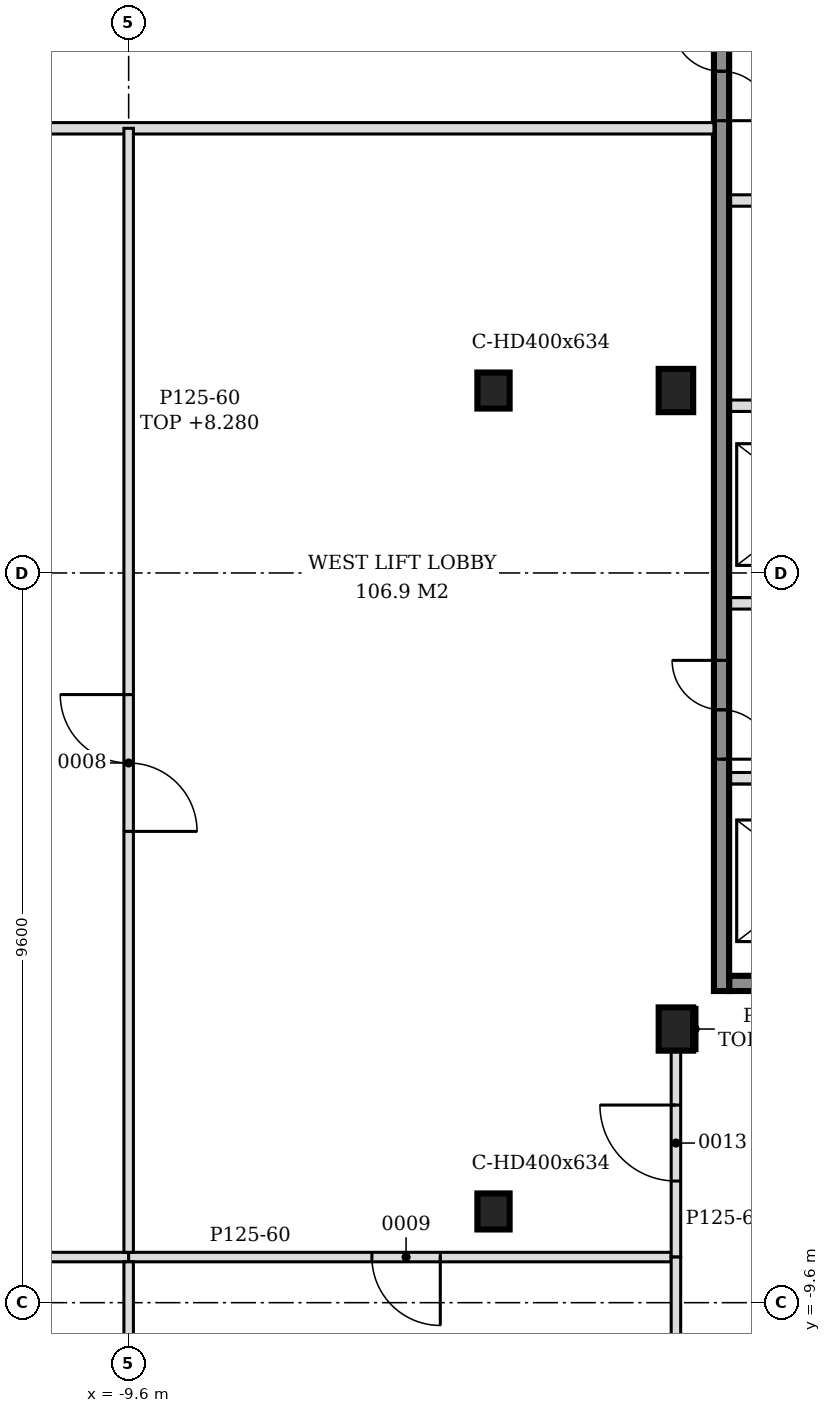
"""IFC4 building model, lengths in metres.
Left out: names, types, materials, properties, quantities, classifications, styles, units other than length and angle.
Written with IfcOpenShell. Run it as: python <this file> out.ifc"""

import sys

from ifc_helpers import new_model, si_unit, direction, frame, frame_2d, origin, origin_2d, place, context, subcontext, project, spatial, polyline, rectangle, i_section, outline, extrude, element, fill, save


model = new_model("IFC4")
c1 = context("Model", 3, precision=1e-05, world=origin(), true_north=direction((0.0, 1.0)))
c2 = subcontext(c1, "Body", "Model", "MODEL_VIEW")
j1 = project(units=[si_unit("LENGTHUNIT", "METRE"), si_unit("PLANEANGLEUNIT", "RADIAN")], contexts=[c1])
p1 = place(None, origin())
s1 = spatial("IfcSite", under=j1, at=p1, CompositionType="ELEMENT")
p2 = place(p1, origin())
s2 = spatial("IfcBuilding", under=s1, at=p2, CompositionType="ELEMENT")
p3 = place(p2, origin())
s3 = spatial("IfcBuildingStorey", under=s2, at=p3, CompositionType="ELEMENT", Elevation=0.0)
for number, where, z_axis, x_axis in (
    (1, (-4.8, -8.4, -0.25), (0.0, 0.0, 1.0), (1.0, 0.0, 0.0)),
    (2, (-4.8, 2.4, -0.25), (0.0, 0.0, 1.0), (1.0, 0.0, 0.0)),
):
    element("IfcColumn", number, at=place(p3, frame(where, z_axis=z_axis, x_axis=x_axis)), inside=s3, PredefinedType="COLUMN", context=c2, shape_type="SweptSolid", body=[
        extrude(i_section(OverallWidth=0.424, OverallDepth=0.474, WebThickness=0.048, FlangeThickness=0.077, FilletRadius=0.015, at=origin_2d()), origin(), (0.0, 0.0, 1.0), 9.05),
    ])
for number, where, z_axis, x_axis in (
    (3, (-2.4, -6.0, -0.25), (0.0, 0.0, 1.0), (1.0, 0.0, 0.0)),
    (4, (-2.4, 2.4, -0.25), (0.0, 0.0, 1.0), (1.0, 0.0, 0.0)),
):
    element("IfcColumn", number, at=place(p3, frame(where, z_axis=z_axis, x_axis=x_axis)), inside=s3, PredefinedType="COLUMN", context=c2, shape_type="SweptSolid", body=[
        extrude(i_section(OverallWidth=0.454, OverallDepth=0.569, WebThickness=0.078, FlangeThickness=0.125, FilletRadius=0.015, at=origin_2d()), origin(), (0.0, 0.0, 1.0), 9.05),
    ])
p4 = place(p3, frame((-1.7, -5.4, 0.0), z_axis=(0.0, 0.0, 1.0), x_axis=(1.0, 0.0, 0.0)))
e5 = element("IfcWall", 5, at=p4, inside=s3, PredefinedType="SOLIDWALL", context=c2, shape_type="SweptSolid", body=[
    extrude(rectangle(XDim=7.9, YDim=0.2, at=frame_2d((3.95, 0.0))), origin(), (0.0, 0.0, 1.0), 8.8),
])
p5 = place(p3, frame((-1.7, -2.7, 0.0), z_axis=(0.0, 0.0, 1.0), x_axis=(1.0, 0.0, 0.0)))
e6 = element("IfcWall", 6, at=p5, inside=s3, PredefinedType="SOLIDWALL", context=c2, shape_type="SweptSolid", body=[
    extrude(rectangle(XDim=7.9, YDim=0.15, at=frame_2d((3.95, 0.0))), origin(), (0.0, 0.0, 1.0), 8.8),
])
p6 = place(p5, frame((0.6, 0.0, 0.0)))
e7 = element("IfcOpeningElement", 7, at=p6, cuts=e6, PredefinedType="OPENING", context=c2, shape_type="SweptSolid", body=[
    extrude(rectangle(XDim=1.1, YDim=2.1, at=frame_2d((0.55, 1.05))), frame((0.0, 0.085, 0.0), z_axis=(0.0, -1.0, 0.0), x_axis=(1.0, 0.0, 0.0)), (0.0, 0.0, 1.0), 0.17),
])
p7 = place(p5, frame((3.1, 0.0, 0.0)))
e8 = element("IfcOpeningElement", 8, at=p7, cuts=e6, PredefinedType="OPENING", context=c2, shape_type="SweptSolid", body=[
    extrude(rectangle(XDim=1.1, YDim=2.1, at=frame_2d((0.55, 1.05))), frame((0.0, 0.085, 0.0), z_axis=(0.0, -1.0, 0.0), x_axis=(1.0, 0.0, 0.0)), (0.0, 0.0, 1.0), 0.17),
])
p8 = place(p5, frame((5.7, 0.0, 0.0)))
e9 = element("IfcOpeningElement", 9, at=p8, cuts=e6, PredefinedType="OPENING", context=c2, shape_type="SweptSolid", body=[
    extrude(rectangle(XDim=1.4, YDim=2.1, at=frame_2d((0.7, 1.05))), frame((0.0, 0.085, 0.0), z_axis=(0.0, -1.0, 0.0), x_axis=(1.0, 0.0, 0.0)), (0.0, 0.0, 1.0), 0.17),
])
p9 = place(p3, frame((-1.7, -0.4, 0.0), z_axis=(0.0, 0.0, 1.0), x_axis=(1.0, 0.0, 0.0)))
e10 = element("IfcWall", 10, at=p9, inside=s3, PredefinedType="SOLIDWALL", context=c2, shape_type="SweptSolid", body=[
    extrude(rectangle(XDim=15.925, YDim=0.15, at=frame_2d((7.962, 0.0))), origin(), (0.0, 0.0, 1.0), 8.8),
])
p10 = place(p9, frame((0.6, 0.0, 0.0)))
e11 = element("IfcOpeningElement", 11, at=p10, cuts=e10, PredefinedType="OPENING", context=c2, shape_type="SweptSolid", body=[
    extrude(rectangle(XDim=1.1, YDim=2.1, at=frame_2d((0.55, 1.05))), frame((0.0, 0.085, 0.0), z_axis=(0.0, -1.0, 0.0), x_axis=(1.0, 0.0, 0.0)), (0.0, 0.0, 1.0), 0.17),
])
p11 = place(p9, frame((3.1, 0.0, 0.0)))
e12 = element("IfcOpeningElement", 12, at=p11, cuts=e10, PredefinedType="OPENING", context=c2, shape_type="SweptSolid", body=[
    extrude(rectangle(XDim=1.1, YDim=2.1, at=frame_2d((0.55, 1.05))), frame((0.0, 0.085, 0.0), z_axis=(0.0, -1.0, 0.0), x_axis=(1.0, 0.0, 0.0)), (0.0, 0.0, 1.0), 0.17),
])
p12 = place(p9, frame((5.7, 0.0, 0.0)))
e13 = element("IfcOpeningElement", 13, at=p12, cuts=e10, PredefinedType="OPENING", context=c2, shape_type="SweptSolid", body=[
    extrude(rectangle(XDim=1.4, YDim=2.1, at=frame_2d((0.7, 1.05))), frame((0.0, 0.085, 0.0), z_axis=(0.0, -1.0, 0.0), x_axis=(1.0, 0.0, 0.0)), (0.0, 0.0, 1.0), 0.17),
])
p13 = place(p9, frame((8.7, 0.0, 0.0)))
e14 = element("IfcOpeningElement", 14, at=p13, cuts=e10, PredefinedType="OPENING", context=c2, shape_type="SweptSolid", body=[
    extrude(rectangle(XDim=1.4, YDim=2.1, at=frame_2d((0.7, 1.05))), frame((0.0, 0.085, 0.0), z_axis=(0.0, -1.0, 0.0), x_axis=(1.0, 0.0, 0.0)), (0.0, 0.0, 1.0), 0.17),
])
p14 = place(p9, frame((11.575, 0.0, 0.0)))
e15 = element("IfcOpeningElement", 15, at=p14, cuts=e10, PredefinedType="OPENING", context=c2, shape_type="SweptSolid", body=[
    extrude(rectangle(XDim=1.2, YDim=2.1, at=frame_2d((0.6, 1.05))), frame((0.0, 0.085, 0.0), z_axis=(0.0, -1.0, 0.0), x_axis=(1.0, 0.0, 0.0)), (0.0, 0.0, 1.0), 0.17),
])
p15 = place(p9, frame((14.125, 0.0, 0.0)))
e16 = element("IfcOpeningElement", 16, at=p15, cuts=e10, PredefinedType="OPENING", context=c2, shape_type="SweptSolid", body=[
    extrude(rectangle(XDim=1.2, YDim=2.1, at=frame_2d((0.6, 1.05))), frame((0.0, 0.085, 0.0), z_axis=(0.0, -1.0, 0.0), x_axis=(1.0, 0.0, 0.0)), (0.0, 0.0, 1.0), 0.17),
])
p16 = place(p3, frame((-1.7, 2.2, 0.0), z_axis=(0.0, 0.0, 1.0), x_axis=(1.0, 0.0, 0.0)))
e17 = element("IfcWall", 17, at=p16, inside=s3, PredefinedType="SOLIDWALL", context=c2, shape_type="SweptSolid", body=[
    extrude(rectangle(XDim=4.9, YDim=0.15, at=frame_2d((2.45, 0.0))), origin(), (0.0, 0.0, 1.0), 8.8),
])
p17 = place(p3, frame((-1.7, 4.9, 0.0), z_axis=(0.0, 0.0, 1.0), x_axis=(1.0, 0.0, 0.0)))
e18 = element("IfcWall", 18, at=p17, inside=s3, PredefinedType="SOLIDWALL", context=c2, shape_type="SweptSolid", body=[
    extrude(rectangle(XDim=4.9, YDim=0.15, at=frame_2d((2.45, 0.0))), origin(), (0.0, 0.0, 1.0), 8.8),
])
p18 = place(p17, frame((1.95, 0.0, 0.0)))
e19 = element("IfcOpeningElement", 19, at=p18, cuts=e18, PredefinedType="OPENING", context=c2, shape_type="SweptSolid", body=[
    extrude(rectangle(XDim=0.9, YDim=2.1, at=frame_2d((0.45, 1.05))), frame((0.0, 0.085, 0.0), z_axis=(0.0, -1.0, 0.0), x_axis=(1.0, 0.0, 0.0)), (0.0, 0.0, 1.0), 0.17),
])
p19 = place(p3, frame((-1.8, -5.5, 0.0), z_axis=(0.0, 0.0, 1.0), x_axis=(0.0, 1.0, 0.0)))
e20 = element("IfcWall", 20, at=p19, inside=s3, PredefinedType="SOLIDWALL", context=c2, shape_type="SweptSolid", body=[
    extrude(rectangle(XDim=15.8, YDim=0.2, at=frame_2d((7.9, 0.0))), origin(), (0.0, 0.0, 1.0), 8.8),
])
p20 = place(p19, frame((3.05, 0.0, 0.0)))
e21 = element("IfcOpeningElement", 21, at=p20, cuts=e20, PredefinedType="OPENING", context=c2, shape_type="SweptSolid", body=[
    extrude(rectangle(XDim=1.3, YDim=2.1, at=frame_2d((0.65, 1.05))), frame((0.0, 0.11, 0.0), z_axis=(0.0, -1.0, 0.0), x_axis=(1.0, 0.0, 0.0)), (0.0, 0.0, 1.0), 0.22),
])
p21 = place(p19, frame((11.45, 0.0, 0.0)))
e22 = element("IfcOpeningElement", 22, at=p21, cuts=e20, PredefinedType="OPENING", context=c2, shape_type="SweptSolid", body=[
    extrude(rectangle(XDim=1.3, YDim=2.1, at=frame_2d((0.65, 1.05))), frame((0.0, 0.11, 0.0), z_axis=(0.0, -1.0, 0.0), x_axis=(1.0, 0.0, 0.0)), (0.0, 0.0, 1.0), 0.22),
])
p22 = place(p3, frame((-33.5, 5.85, 0.0), z_axis=(0.0, 0.0, 1.0), x_axis=(1.0, 0.0, 0.0)))
e23 = element("IfcWall", 23, at=p22, inside=s3, PredefinedType="SOLIDWALL", context=c2, shape_type="SweptSolid", body=[
    extrude(rectangle(XDim=31.6, YDim=0.15, at=frame_2d((15.8, 0.0))), origin(), (0.0, 0.0, 1.0), 8.8),
])
p23 = place(p3, frame((-2.4, -23.906, 0.0), z_axis=(0.0, 0.0, 1.0), x_axis=(0.0, 1.0, 0.0)))
e24 = element("IfcWall", 24, at=p23, inside=s3, PredefinedType="PARTITIONING", context=c2, shape_type="SweptSolid", body=[
    extrude(outline(polyline([(0.0, 0.0), (14.906, 0.0), (14.906, 8.8), (0.956, 8.8), (0.954, 8.18), (0.656, 8.18), (0.654, 8.8), (0.0, 8.8), (0.0, 0.0)])), frame((0.0, 0.062, 0.0), z_axis=(0.0, -1.0, 0.0), x_axis=(1.0, 0.0, 0.0)), (0.0, 0.0, 1.0), 0.125),
])
p24 = place(p3, frame((-9.6, -22.55, 0.0), z_axis=(0.0, 0.0, 1.0), x_axis=(0.0, 1.0, 0.0)))
e25 = element("IfcWall", 25, at=p24, inside=s3, PredefinedType="PARTITIONING", context=c2, shape_type="SweptSolid", body=[
    extrude(rectangle(XDim=13.488, YDim=0.125, at=frame_2d((6.744, 0.0))), origin(), (0.0, 0.0, 1.0), 8.8),
])
p25 = place(p3, frame((-33.556, -9.0, 0.0), z_axis=(0.0, 0.0, 1.0), x_axis=(1.0, 0.0, 0.0)))
e26 = element("IfcWall", 26, at=p25, inside=s3, PredefinedType="PARTITIONING", context=c2, shape_type="SweptSolid", body=[
    extrude(outline(polyline([(0.0, 0.0), (23.956, 0.0), (23.956, 8.8), (19.256, 8.8), (19.254, 8.28), (19.056, 8.28), (19.054, 8.8), (14.456, 8.8), (14.454, 8.28), (14.256, 8.28), (14.254, 8.8), (9.656, 8.8), (9.654, 8.28), (9.456, 8.28), (9.454, 8.8), (5.806, 8.8), (5.804, 8.18), (5.506, 8.18), (5.504, 8.8), (0.0, 8.8), (0.0, 0.0)])), frame((0.0, 0.062, 0.0), z_axis=(0.0, -1.0, 0.0), x_axis=(1.0, 0.0, 0.0)), (0.0, 0.0, 1.0), 0.125),
])
p26 = place(p25, frame((11.656, 0.0, 0.0)))
e27 = element("IfcOpeningElement", 27, at=p26, cuts=e26, PredefinedType="OPENING", context=c2, shape_type="SweptSolid", body=[
    extrude(rectangle(XDim=1.8, YDim=2.1, at=frame_2d((0.9, 1.05))), frame((0.0, 0.073, 0.0), z_axis=(0.0, -1.0, 0.0), x_axis=(1.0, 0.0, 0.0)), (0.0, 0.0, 1.0), 0.145),
])
p27 = place(p25, frame((19.906, 0.0, 0.0)))
e28 = element("IfcOpeningElement", 28, at=p27, cuts=e26, PredefinedType="OPENING", context=c2, shape_type="SweptSolid", body=[
    extrude(rectangle(XDim=1.8, YDim=2.1, at=frame_2d((0.9, 1.05))), frame((0.0, 0.073, 0.0), z_axis=(0.0, -1.0, 0.0), x_axis=(1.0, 0.0, 0.0)), (0.0, 0.0, 1.0), 0.145),
])
p28 = place(p3, frame((-9.6, -9.0, 0.0), z_axis=(0.0, 0.0, 1.0), x_axis=(1.0, 0.0, 0.0)))
e29 = element("IfcWall", 29, at=p28, inside=s3, PredefinedType="PARTITIONING", context=c2, shape_type="SweptSolid", body=[
    extrude(outline(polyline([(0.0, 0.0), (7.138, 0.0), (7.137, 8.8), (4.95, 8.8), (4.948, 8.18), (4.65, 8.18), (4.648, 8.8), (0.0, 8.8), (0.0, 0.0)])), frame((0.0, 0.062, 0.0), z_axis=(0.0, -1.0, 0.0), x_axis=(1.0, 0.0, 0.0)), (0.0, 0.0, 1.0), 0.125),
])
p29 = place(p28, frame((3.2, 0.0, 0.0)))
e30 = element("IfcOpeningElement", 30, at=p29, cuts=e29, PredefinedType="OPENING", context=c2, shape_type="SweptSolid", body=[
    extrude(rectangle(XDim=0.9, YDim=2.1, at=frame_2d((0.45, 1.05))), frame((0.0, 0.073, 0.0), z_axis=(0.0, -1.0, 0.0), x_axis=(1.0, 0.0, 0.0)), (0.0, 0.0, 1.0), 0.145),
])
p30 = place(p3, frame((-2.4, -9.0, 0.0), z_axis=(0.0, 0.0, 1.0), x_axis=(0.0, 1.0, 0.0)))
e31 = element("IfcWall", 31, at=p30, inside=s3, PredefinedType="PARTITIONING", context=c2, shape_type="SweptSolid", body=[
    extrude(outline(polyline([(0.0, 0.0), (2.716, 0.0), (2.716, 8.8), (0.75, 8.8), (0.748, 8.08), (0.45, 8.08), (0.448, 8.8), (0.0, 8.8), (0.0, 0.0)])), frame((0.0, 0.062, 0.0), z_axis=(0.0, -1.0, 0.0), x_axis=(1.0, 0.0, 0.0)), (0.0, 0.0, 1.0), 0.125),
])
p31 = place(p30, frame((1.0, 0.0, 0.0)))
e32 = element("IfcOpeningElement", 32, at=p31, cuts=e31, PredefinedType="OPENING", context=c2, shape_type="SweptSolid", body=[
    extrude(rectangle(XDim=1.0, YDim=2.1, at=frame_2d((0.5, 1.05))), frame((0.0, 0.073, 0.0), z_axis=(0.0, -1.0, 0.0), x_axis=(1.0, 0.0, 0.0)), (0.0, 0.0, 1.0), 0.145),
])
p32 = place(p3, frame((-9.6, -8.938, 0.0), z_axis=(0.0, 0.0, 1.0), x_axis=(0.0, 1.0, 0.0)))
e33 = element("IfcWall", 33, at=p32, inside=s3, PredefinedType="PARTITIONING", context=c2, shape_type="SweptSolid", body=[
    extrude(outline(polyline([(0.0, 0.0), (14.788, 0.0), (14.788, 8.28), (9.087, 8.28), (9.085, 8.18), (8.788, 8.18), (8.785, 8.28), (0.0, 8.28), (0.0, 0.0)])), frame((0.0, 0.062, 0.0), z_axis=(0.0, -1.0, 0.0), x_axis=(1.0, 0.0, 0.0)), (0.0, 0.0, 1.0), 0.125),
])
p33 = place(p32, frame((5.538, 0.0, 0.0)))
e34 = element("IfcOpeningElement", 34, at=p33, cuts=e33, PredefinedType="OPENING", context=c2, shape_type="SweptSolid", body=[
    extrude(rectangle(XDim=1.8, YDim=2.1, at=frame_2d((0.9, 1.05))), frame((0.0, 0.073, 0.0), z_axis=(0.0, -1.0, 0.0), x_axis=(1.0, 0.0, 0.0)), (0.0, 0.0, 1.0), 0.145),
])
p34 = place(p3, frame((-2.148, -6.284, 0.0), z_axis=(0.0, 0.0, 1.0), x_axis=(0.0, 1.0, 0.0)))
e35 = element("IfcWall", 35, at=p34, inside=s3, PredefinedType="PARTITIONING", context=c2, shape_type="SweptSolid", body=[
    extrude(rectangle(XDim=0.569, YDim=0.05, at=frame_2d((0.284, 0.0))), origin(), (0.0, 0.0, 1.0), 8.18),
])
p35 = place(p20, origin())
e36 = element("IfcDoor", 36, at=p35, inside=s3, OperationType="DOUBLE_DOOR_SINGLE_SWING", PredefinedType="DOOR", context=c2, shape_type="SweptSolid", body=[
    extrude(rectangle(XDim=1.3, YDim=2.1, at=frame_2d((0.65, 1.05))), frame((0.0, 0.025, 0.0), z_axis=(0.0, -1.0, 0.0), x_axis=(1.0, 0.0, 0.0)), (0.0, 0.0, 1.0), 0.05),
])
fill(e21, e36)
p36 = place(p21, origin())
e37 = element("IfcDoor", 37, at=p36, inside=s3, OperationType="DOUBLE_DOOR_SINGLE_SWING", PredefinedType="DOOR", context=c2, shape_type="SweptSolid", body=[
    extrude(rectangle(XDim=1.3, YDim=2.1, at=frame_2d((0.65, 1.05))), frame((0.0, 0.025, 0.0), z_axis=(0.0, -1.0, 0.0), x_axis=(1.0, 0.0, 0.0)), (0.0, 0.0, 1.0), 0.05),
])
fill(e22, e37)
p37 = place(p33, frame((1.8, 0.0, 0.0), z_axis=(0.0, 0.0, 1.0), x_axis=(-1.0, 0.0, 0.0)))
e38 = element("IfcDoor", 38, at=p37, inside=s3, OperationType="DOUBLE_DOOR_SINGLE_SWING", PredefinedType="DOOR", context=c2, shape_type="SweptSolid", body=[
    extrude(rectangle(XDim=1.8, YDim=2.1, at=frame_2d((0.9, 1.05))), frame((0.0, 0.025, 0.0), z_axis=(0.0, -1.0, 0.0), x_axis=(1.0, 0.0, 0.0)), (0.0, 0.0, 1.0), 0.05),
])
fill(e34, e38)
p38 = place(p29, frame((0.9, 0.0, 0.0), z_axis=(0.0, 0.0, 1.0), x_axis=(-1.0, 0.0, 0.0)))
e39 = element("IfcDoor", 39, at=p38, inside=s3, OperationType="SINGLE_SWING_LEFT", PredefinedType="DOOR", context=c2, shape_type="SweptSolid", body=[
    extrude(rectangle(XDim=0.9, YDim=2.1, at=frame_2d((0.45, 1.05))), frame((0.0, 0.025, 0.0), z_axis=(0.0, -1.0, 0.0), x_axis=(1.0, 0.0, 0.0)), (0.0, 0.0, 1.0), 0.05),
])
fill(e30, e39)
p39 = place(p31, origin())
e40 = element("IfcDoor", 40, at=p39, inside=s3, OperationType="SINGLE_SWING_RIGHT", PredefinedType="DOOR", context=c2, shape_type="SweptSolid", body=[
    extrude(rectangle(XDim=1.0, YDim=2.1, at=frame_2d((0.5, 1.05))), frame((0.0, 0.025, 0.0), z_axis=(0.0, -1.0, 0.0), x_axis=(1.0, 0.0, 0.0)), (0.0, 0.0, 1.0), 0.05),
])
fill(e32, e40)
save(model, sys.argv[1])
